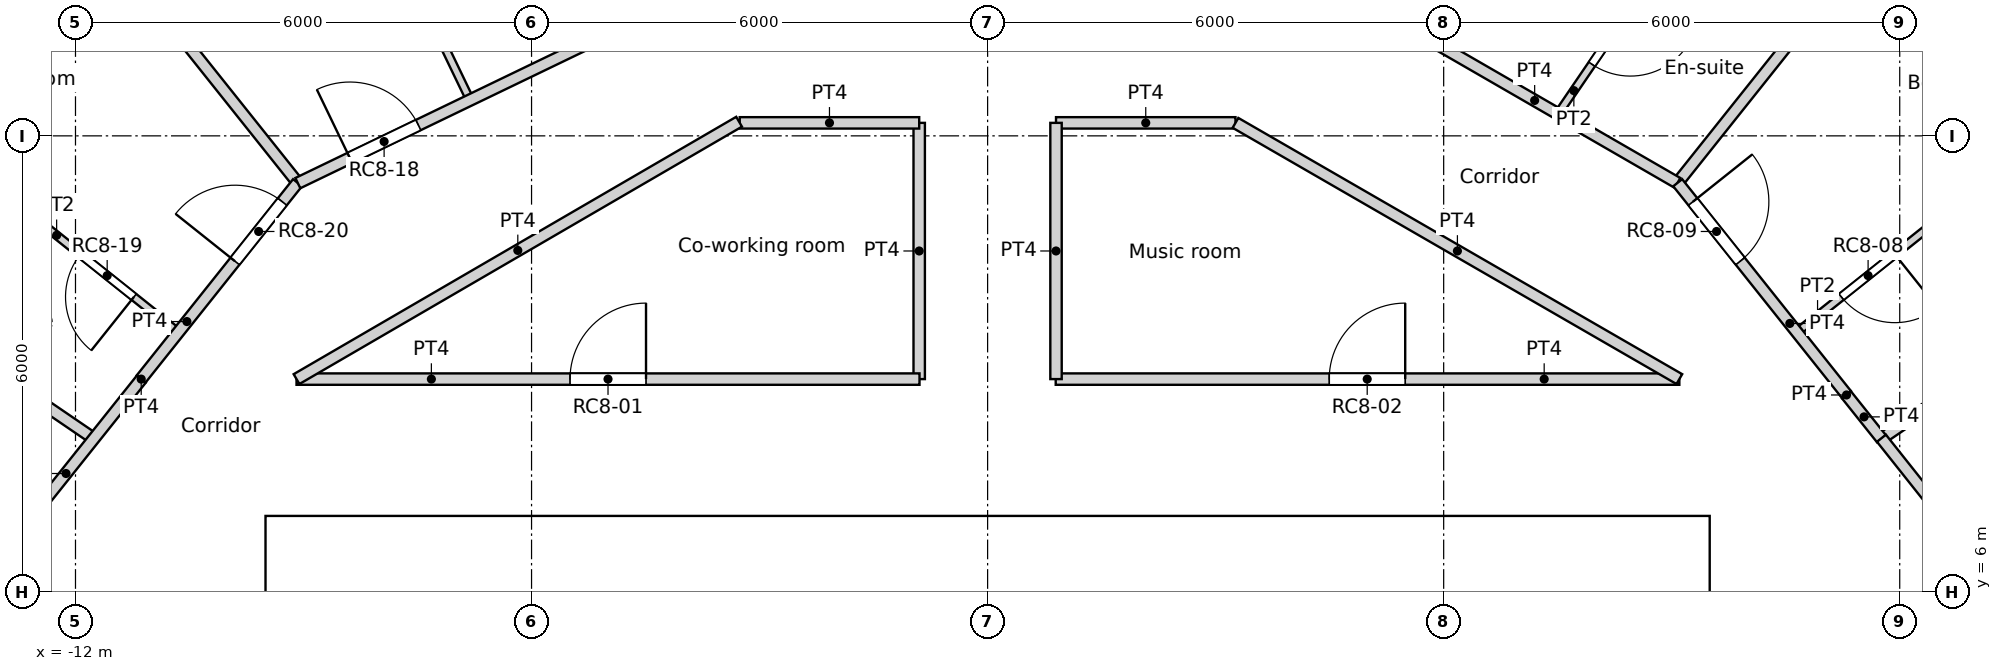
"""IFC4 building model, lengths in metres.
Left out: names, types, materials, properties, quantities, classifications, styles, units other than length and angle.
Written with IfcOpenShell. Run it as: python <this file> out.ifc"""

import sys

from ifc_helpers import new_model, si_unit, direction, frame, frame_2d, origin, place, context, subcontext, project, spatial, rectangle, extrude, element, fill, save


model = new_model("IFC4")
c1 = context("Model", 3, precision=1e-05, world=origin(), true_north=direction((0.0, 1.0)))
c2 = subcontext(c1, "Body", "Model", "MODEL_VIEW")
j1 = project(units=[si_unit("LENGTHUNIT", "METRE"), si_unit("PLANEANGLEUNIT", "RADIAN")], contexts=[c1])
p1 = place(None, origin())
s1 = spatial("IfcSite", under=j1, at=p1, CompositionType="ELEMENT")
p2 = place(p1, origin())
s2 = spatial("IfcBuilding", under=s1, at=p2, CompositionType="ELEMENT")
p3 = place(p2, frame((0.0, 0.0, 305.4)))
s3 = spatial("IfcBuildingStorey", under=s2, at=p3, CompositionType="ELEMENT", Elevation=305.4)
p4 = place(p3, frame((-9.5, 6.7, 0.0), z_axis=(0.0, 0.0, 1.0), x_axis=(1.0, 0.0, 0.0)))
e1 = element("IfcWall", 1, at=p4, inside=s3, PredefinedType="SOLIDWALL", context=c2, shape_type="SweptSolid", body=[
    extrude(rectangle(XDim=19.0, YDim=0.6, at=frame_2d((9.5, 0.0))), origin(), (0.0, 0.0, 1.0), 3.6),
])
p5 = place(p4, frame((5.35, 0.0, 0.0)))
e2 = element("IfcOpeningElement", 2, at=p5, cuts=e1, PredefinedType="OPENING", context=c2, shape_type="SweptSolid", body=[
    extrude(rectangle(XDim=1.7, YDim=2.1, at=frame_2d((0.85, 1.05))), frame((0.0, 0.3, 0.0), z_axis=(0.0, -1.0, 0.0), x_axis=(1.0, 0.0, 0.0)), (0.0, 0.0, 1.0), 0.6),
])
p6 = place(p3, frame((-9.2, -6.4, 0.0), z_axis=(0.0, 0.0, 1.0), x_axis=(0.0, 1.0, 0.0)))
e3 = element("IfcWall", 3, at=p6, inside=s3, PredefinedType="SOLIDWALL", context=c2, shape_type="SweptSolid", body=[
    extrude(rectangle(XDim=12.8, YDim=0.6, at=frame_2d((6.4, 0.0))), origin(), (0.0, 0.0, 1.0), 3.6),
])
p7 = place(p3, frame((9.2, -6.4, 0.0), z_axis=(0.0, 0.0, 1.0), x_axis=(0.0, 1.0, 0.0)))
e4 = element("IfcWall", 4, at=p7, inside=s3, PredefinedType="SOLIDWALL", context=c2, shape_type="SweptSolid", body=[
    extrude(rectangle(XDim=12.8, YDim=0.6, at=frame_2d((6.4, 0.0))), origin(), (0.0, 0.0, 1.0), 3.6),
])
p8 = place(p7, frame((6.4, 0.0, 0.0)))
e5 = element("IfcOpeningElement", 5, at=p8, cuts=e4, PredefinedType="OPENING", context=c2, shape_type="SweptSolid", body=[
    extrude(rectangle(XDim=1.8, YDim=2.1, at=frame_2d((0.9, 1.05))), frame((0.0, 0.3, 0.0), z_axis=(0.0, -1.0, 0.0), x_axis=(1.0, 0.0, 0.0)), (0.0, 0.0, 1.0), 0.6),
])
for number, where, z_axis, x_axis in (
    (6, (-2.25, 3.25, 0.0), (0.0, 0.0, 1.0), (0.0, 1.0, 0.0)),
    (7, (0.55, 3.25, 0.0), (0.0, 0.0, 1.0), (0.0, 1.0, 0.0)),
    (8, (3.35, 3.25, 0.0), (0.0, 0.0, 1.0), (0.0, 1.0, 0.0)),
    (9, (6.15, 3.25, 0.0), (0.0, 0.0, 1.0), (0.0, 1.0, 0.0)),
):
    element("IfcWall", number, at=place(p3, frame(where, z_axis=z_axis, x_axis=x_axis)), inside=s3, PredefinedType="SOLIDWALL", context=c2, shape_type="SweptSolid", body=[
        extrude(rectangle(XDim=3.15, YDim=0.3, at=frame_2d((1.575, 0.0))), origin(), (0.0, 0.0, 1.0), 3.25),
    ])
p9 = place(p3, frame((-9.092, 8.8, 0.0), z_axis=(0.0, 0.0, 1.0), x_axis=(0.864470922103, 0.502682827277, 0.0)))
e10 = element("IfcWall", 10, at=p9, inside=s3, PredefinedType="PARTITIONING", context=c2, shape_type="SweptSolid", body=[
    extrude(rectangle(XDim=6.735, YDim=0.15, at=frame_2d((3.368, 0.0))), origin(), (0.0, 0.0, 1.0), 3.25),
])
p10 = place(p3, frame((-9.092, 8.8, 0.0), z_axis=(0.0, 0.0, 1.0), x_axis=(1.0, 0.0, 0.0)))
e11 = element("IfcWall", 11, at=p10, inside=s3, PredefinedType="PARTITIONING", context=c2, shape_type="SweptSolid", body=[
    extrude(rectangle(XDim=8.196, YDim=0.15, at=frame_2d((4.098, 0.0))), origin(), (0.0, 0.0, 1.0), 3.25),
])
p11 = place(p10, frame((3.598, 0.0, 0.0)))
e12 = element("IfcOpeningElement", 12, at=p11, cuts=e11, PredefinedType="OPENING", context=c2, shape_type="SweptSolid", body=[
    extrude(rectangle(XDim=1.0, YDim=2.04, at=frame_2d((0.5, 1.02))), frame((0.0, 0.075, 0.0), z_axis=(0.0, -1.0, 0.0), x_axis=(1.0, 0.0, 0.0)), (0.0, 0.0, 1.0), 0.15),
])
p12 = place(p3, frame((0.896, 8.8, 0.0), z_axis=(0.0, 0.0, 1.0), x_axis=(1.0, 0.0, 0.0)))
e13 = element("IfcWall", 13, at=p12, inside=s3, PredefinedType="PARTITIONING", context=c2, shape_type="SweptSolid", body=[
    extrude(rectangle(XDim=8.205, YDim=0.15, at=frame_2d((4.102, 0.0))), origin(), (0.0, 0.0, 1.0), 3.25),
])
p13 = place(p12, frame((3.598, 0.0, 0.0)))
e14 = element("IfcOpeningElement", 14, at=p13, cuts=e13, PredefinedType="OPENING", context=c2, shape_type="SweptSolid", body=[
    extrude(rectangle(XDim=1.0, YDim=2.04, at=frame_2d((0.5, 1.02))), frame((0.0, 0.075, 0.0), z_axis=(0.0, -1.0, 0.0), x_axis=(1.0, 0.0, 0.0)), (0.0, 0.0, 1.0), 0.15),
])
p14 = place(p3, frame((9.079, 11.384, 0.0), z_axis=(0.0, 0.0, 1.0), x_axis=(0.623165080354, -0.782090328944, 0.0)))
e15 = element("IfcWall", 15, at=p14, inside=s3, PredefinedType="PARTITIONING", context=c2, shape_type="SweptSolid", body=[
    extrude(rectangle(XDim=3.564, YDim=0.15, at=frame_2d((1.782, 0.0))), origin(), (0.0, 0.0, 1.0), 3.25),
])
p15 = place(p14, frame((0.32, 0.0, 0.0)))
e16 = element("IfcOpeningElement", 16, at=p15, cuts=e15, PredefinedType="OPENING", context=c2, shape_type="SweptSolid", body=[
    extrude(rectangle(XDim=1.0, YDim=2.1, at=frame_2d((0.5, 1.05))), frame((0.0, 0.075, 0.0), z_axis=(0.0, -1.0, 0.0), x_axis=(1.0, 0.0, 0.0)), (0.0, 0.0, 1.0), 0.15),
])
p16 = place(p3, frame((11.3, 8.586, 0.0), z_axis=(0.0, 0.0, 1.0), x_axis=(0.0, 1.0, 0.0)))
e17 = element("IfcWall", 17, at=p16, inside=s3, PredefinedType="PARTITIONING", context=c2, shape_type="SweptSolid", body=[
    extrude(rectangle(XDim=0.01, YDim=0.15, at=frame_2d((0.005, 0.0))), origin(), (0.0, 0.0, 1.0), 3.25),
])
p17 = place(p3, frame((-11.136, 8.802, 0.0), z_axis=(0.0, 0.0, 1.0), x_axis=(0.623151397235, 0.782101231379, 0.0)))
e18 = element("IfcWall", 18, at=p17, inside=s3, PredefinedType="PARTITIONING", context=c2, shape_type="SweptSolid", body=[
    extrude(rectangle(XDim=3.301, YDim=0.15, at=frame_2d((1.65, 0.0))), origin(), (0.0, 0.0, 1.0), 3.25),
])
p18 = place(p17, frame((1.981, 0.0, 0.0)))
e19 = element("IfcOpeningElement", 19, at=p18, cuts=e18, PredefinedType="OPENING", context=c2, shape_type="SweptSolid", body=[
    extrude(rectangle(XDim=1.0, YDim=2.1, at=frame_2d((0.5, 1.05))), frame((0.0, 0.075, 0.0), z_axis=(0.0, -1.0, 0.0), x_axis=(1.0, 0.0, 0.0)), (0.0, 0.0, 1.0), 0.15),
])
p19 = place(p3, frame((-11.134, 8.8, 0.0), z_axis=(0.0, 0.0, 1.0), x_axis=(-1.0, 0.0, 0.0)))
e20 = element("IfcWall", 20, at=p19, inside=s3, PredefinedType="PARTITIONING", context=c2, shape_type="SweptSolid", body=[
    extrude(rectangle(XDim=0.003, YDim=0.15, at=frame_2d((0.001, 0.0))), origin(), (0.0, 0.0, 1.0), 3.25),
])
p20 = place(p3, frame((11.76, 8.022, 0.0), z_axis=(0.0, 0.0, 1.0), x_axis=(0.62206805366, -0.782963177049, 0.0)))
e21 = element("IfcWall", 21, at=p20, inside=s3, PredefinedType="PARTITIONING", context=c2, shape_type="SweptSolid", body=[
    extrude(rectangle(XDim=2.179, YDim=0.15, at=frame_2d((1.089, 0.0))), origin(), (0.0, 0.0, 1.0), 3.25),
])
p21 = place(p3, frame((11.3, 8.592, 0.0), z_axis=(0.0, 0.0, 1.0), x_axis=(0.623405636383, -0.781898594785, 0.0)))
e22 = element("IfcWall", 22, at=p21, inside=s3, PredefinedType="PARTITIONING", context=c2, shape_type="SweptSolid", body=[
    extrude(rectangle(XDim=0.74, YDim=0.15, at=frame_2d((0.37, 0.0))), origin(), (0.0, 0.0, 1.0), 3.25),
])
p22 = place(p3, frame((-0.9, 8.8, 0.0), z_axis=(0.0, 0.0, 1.0), x_axis=(0.0, 1.0, 0.0)))
e23 = element("IfcWall", 23, at=p22, inside=s3, PredefinedType="PARTITIONING", context=c2, shape_type="SweptSolid", body=[
    extrude(rectangle(XDim=3.371, YDim=0.15, at=frame_2d((1.686, 0.0))), origin(), (0.0, 0.0, 1.0), 3.25),
])
p23 = place(p3, frame((-3.261, 12.171, 0.0), z_axis=(0.0, 0.0, 1.0), x_axis=(1.0, 0.0, 0.0)))
e24 = element("IfcWall", 24, at=p23, inside=s3, PredefinedType="PARTITIONING", context=c2, shape_type="SweptSolid", body=[
    extrude(rectangle(XDim=2.361, YDim=0.15, at=frame_2d((1.181, 0.0))), origin(), (0.0, 0.0, 1.0), 3.25),
])
p24 = place(p3, frame((3.261, 12.171, 0.0), z_axis=(0.0, 0.0, 1.0), x_axis=(0.866066809554, -0.499928276245, 0.0)))
e25 = element("IfcWall", 25, at=p24, inside=s3, PredefinedType="PARTITIONING", context=c2, shape_type="SweptSolid", body=[
    extrude(rectangle(XDim=6.743, YDim=0.15, at=frame_2d((3.371, 0.0))), origin(), (0.0, 0.0, 1.0), 3.25),
])
p25 = place(p3, frame((0.9, 12.171, 0.0), z_axis=(0.0, 0.0, 1.0), x_axis=(1.0, 0.0, 0.0)))
e26 = element("IfcWall", 26, at=p25, inside=s3, PredefinedType="PARTITIONING", context=c2, shape_type="SweptSolid", body=[
    extrude(rectangle(XDim=2.361, YDim=0.15, at=frame_2d((1.181, 0.0))), origin(), (0.0, 0.0, 1.0), 3.25),
])
p26 = place(p3, frame((0.9, 8.8, 0.0), z_axis=(0.0, 0.0, 1.0), x_axis=(0.0, 1.0, 0.0)))
e27 = element("IfcWall", 27, at=p26, inside=s3, PredefinedType="PARTITIONING", context=c2, shape_type="SweptSolid", body=[
    extrude(rectangle(XDim=3.371, YDim=0.15, at=frame_2d((1.686, 0.0))), origin(), (0.0, 0.0, 1.0), 3.25),
])
p27 = place(p3, frame((5.318, 13.551, 0.0), z_axis=(0.0, 0.0, 1.0), x_axis=(0.865990693744, -0.500060114735, 0.0)))
e28 = element("IfcWall", 28, at=p27, inside=s3, PredefinedType="PARTITIONING", context=c2, shape_type="SweptSolid", body=[
    extrude(rectangle(XDim=4.339, YDim=0.15, at=frame_2d((2.17, 0.0))), origin(), (0.0, 0.0, 1.0), 3.25),
])
p28 = place(p3, frame((-9.075, 11.378, 0.0), z_axis=(0.0, 0.0, 1.0), x_axis=(0.900778421649, 0.434278983018, 0.0)))
e29 = element("IfcWall", 29, at=p28, inside=s3, PredefinedType="PARTITIONING", context=c2, shape_type="SweptSolid", body=[
    extrude(rectangle(XDim=6.479, YDim=0.15, at=frame_2d((3.239, 0.0))), origin(), (0.0, 0.0, 1.0), 3.25),
])
p29 = place(p28, frame((0.76, 0.0, 0.0)))
e30 = element("IfcOpeningElement", 30, at=p29, cuts=e29, PredefinedType="OPENING", context=c2, shape_type="SweptSolid", body=[
    extrude(rectangle(XDim=1.0, YDim=2.1, at=frame_2d((0.5, 1.05))), frame((0.0, 0.075, 0.0), z_axis=(0.0, -1.0, 0.0), x_axis=(1.0, 0.0, 0.0)), (0.0, 0.0, 1.0), 0.15),
])
p30 = place(p3, frame((-13.115, 6.316, 0.0), z_axis=(0.0, 0.0, 1.0), x_axis=(0.623560523309, 0.781775078761, 0.0)))
e31 = element("IfcWall", 31, at=p30, inside=s3, PredefinedType="PARTITIONING", context=c2, shape_type="SweptSolid", body=[
    extrude(rectangle(XDim=3.177, YDim=0.15, at=frame_2d((1.589, 0.0))), origin(), (0.0, 0.0, 1.0), 3.25),
])
p31 = place(p3, frame((11.759, 8.017, 0.0), z_axis=(0.0, 0.0, 1.0), x_axis=(0.826143746222, 0.563459413426, 0.0)))
e32 = element("IfcWall", 32, at=p31, inside=s3, PredefinedType="PARTITIONING", context=c2, shape_type="SweptSolid", body=[
    extrude(rectangle(XDim=2.41, YDim=0.15, at=frame_2d((1.205, 0.0))), origin(), (0.0, 0.0, 1.0), 3.25),
])
p32 = place(p3, frame((10.645, 9.413, 0.0), z_axis=(0.0, 0.0, 1.0), x_axis=(0.781830263661, 0.623491330191, 0.0)))
e33 = element("IfcWall", 33, at=p32, inside=s3, PredefinedType="PARTITIONING", context=c2, shape_type="SweptSolid", body=[
    extrude(rectangle(XDim=2.401, YDim=0.1, at=frame_2d((1.2, 0.0))), origin(), (0.0, 0.0, 1.0), 3.25),
])
p33 = place(p32, frame((0.751, 0.0, 0.0)))
e34 = element("IfcOpeningElement", 34, at=p33, cuts=e33, PredefinedType="OPENING", context=c2, shape_type="SweptSolid", body=[
    extrude(rectangle(XDim=0.9, YDim=2.04, at=frame_2d((0.45, 1.02))), frame((0.0, 0.05, 0.0), z_axis=(0.0, -1.0, 0.0), x_axis=(1.0, 0.0, 0.0)), (0.0, 0.0, 1.0), 0.1),
])
p34 = place(p3, frame((9.076, 11.381, 0.0), z_axis=(0.0, 0.0, 1.0), x_axis=(0.623409504508, 0.781895510723, 0.0)))
e35 = element("IfcWall", 35, at=p34, inside=s3, PredefinedType="PARTITIONING", context=c2, shape_type="SweptSolid", body=[
    extrude(rectangle(XDim=5.214, YDim=0.15, at=frame_2d((2.607, 0.0))), origin(), (0.0, 0.0, 1.0), 3.25),
])
p35 = place(p3, frame((7.504, 12.289, 0.0), z_axis=(0.0, 0.0, 1.0), x_axis=(0.563272733387, 0.826271037749, 0.0)))
e36 = element("IfcWall", 36, at=p35, inside=s3, PredefinedType="PARTITIONING", context=c2, shape_type="SweptSolid", body=[
    extrude(rectangle(XDim=2.482, YDim=0.1, at=frame_2d((1.241, 0.0))), origin(), (0.0, 0.0, 1.0), 3.25),
])
p36 = place(p35, frame((0.791, 0.0, 0.0)))
e37 = element("IfcOpeningElement", 37, at=p36, cuts=e36, PredefinedType="OPENING", context=c2, shape_type="SweptSolid", body=[
    extrude(rectangle(XDim=0.9, YDim=2.04, at=frame_2d((0.45, 1.02))), frame((0.0, 0.05, 0.0), z_axis=(0.0, -1.0, 0.0), x_axis=(1.0, 0.0, 0.0)), (0.0, 0.0, 1.0), 0.1),
])
p37 = place(p3, frame((-7.85, 14.635, 0.0), z_axis=(0.0, 0.0, 1.0), x_axis=(0.433815618773, -0.901001669759, 0.0)))
e38 = element("IfcWall", 38, at=p37, inside=s3, PredefinedType="PARTITIONING", context=c2, shape_type="SweptSolid", body=[
    extrude(rectangle(XDim=2.4, YDim=0.1, at=frame_2d((1.2, 0.0))), origin(), (0.0, 0.0, 1.0), 3.25),
])
p38 = place(p37, frame((0.75, 0.0, 0.0)))
e39 = element("IfcOpeningElement", 39, at=p38, cuts=e38, PredefinedType="OPENING", context=c2, shape_type="SweptSolid", body=[
    extrude(rectangle(XDim=0.9, YDim=2.04, at=frame_2d((0.45, 1.02))), frame((0.0, 0.05, 0.0), z_axis=(0.0, -1.0, 0.0), x_axis=(1.0, 0.0, 0.0)), (0.0, 0.0, 1.0), 0.1),
])
p39 = place(p3, frame((-12.327, 15.458, 0.0), z_axis=(0.0, 0.0, 1.0), x_axis=(0.623460949534, -0.781854490558, 0.0)))
e40 = element("IfcWall", 40, at=p39, inside=s3, PredefinedType="PARTITIONING", context=c2, shape_type="SweptSolid", body=[
    extrude(rectangle(XDim=5.214, YDim=0.15, at=frame_2d((2.607, 0.0))), origin(), (0.0, 0.0, 1.0), 3.25),
])
p40 = place(p3, frame((-12.522, 10.91, 0.0), z_axis=(0.0, 0.0, 1.0), x_axis=(0.781830263661, -0.623491330191, 0.0)))
e41 = element("IfcWall", 41, at=p40, inside=s3, PredefinedType="PARTITIONING", context=c2, shape_type="SweptSolid", body=[
    extrude(rectangle(XDim=2.401, YDim=0.1, at=frame_2d((1.2, 0.0))), origin(), (0.0, 0.0, 1.0), 3.25),
])
p41 = place(p40, frame((0.751, 0.0, 0.0)))
e42 = element("IfcOpeningElement", 42, at=p41, cuts=e41, PredefinedType="OPENING", context=c2, shape_type="SweptSolid", body=[
    extrude(rectangle(XDim=0.9, YDim=2.04, at=frame_2d((0.45, 1.02))), frame((0.0, 0.05, 0.0), z_axis=(0.0, -1.0, 0.0), x_axis=(1.0, 0.0, 0.0)), (0.0, 0.0, 1.0), 0.1),
])
p42 = place(p3, frame((-13.747, 9.373, 0.0), z_axis=(0.0, 0.0, 1.0), x_axis=(0.826135036312, -0.563472183677, 0.0)))
e43 = element("IfcWall", 43, at=p42, inside=s3, PredefinedType="PARTITIONING", context=c2, shape_type="SweptSolid", body=[
    extrude(rectangle(XDim=2.406, YDim=0.15, at=frame_2d((1.203, 0.0))), origin(), (0.0, 0.0, 1.0), 3.25),
])
p43 = place(p5, origin())
e44 = element("IfcDoor", 44, at=p43, inside=s3, OperationType="DOUBLE_DOOR_SINGLE_SWING", PredefinedType="DOOR", context=c2, shape_type="SweptSolid", body=[
    extrude(rectangle(XDim=1.7, YDim=2.1, at=frame_2d((0.85, 1.05))), frame((0.0, 0.025, 0.0), z_axis=(0.0, -1.0, 0.0), x_axis=(1.0, 0.0, 0.0)), (0.0, 0.0, 1.0), 0.05),
])
fill(e2, e44)
p44 = place(p11, origin())
e45 = element("IfcDoor", 45, at=p44, inside=s3, OperationType="SINGLE_SWING_RIGHT", PredefinedType="DOOR", context=c2, shape_type="SweptSolid", body=[
    extrude(rectangle(XDim=1.0, YDim=2.04, at=frame_2d((0.5, 1.02))), frame((0.0, 0.025, 0.0), z_axis=(0.0, -1.0, 0.0), x_axis=(1.0, 0.0, 0.0)), (0.0, 0.0, 1.0), 0.05),
])
fill(e12, e45)
p45 = place(p13, origin())
e46 = element("IfcDoor", 46, at=p45, inside=s3, OperationType="SINGLE_SWING_RIGHT", PredefinedType="DOOR", context=c2, shape_type="SweptSolid", body=[
    extrude(rectangle(XDim=1.0, YDim=2.04, at=frame_2d((0.5, 1.02))), frame((0.0, 0.025, 0.0), z_axis=(0.0, -1.0, 0.0), x_axis=(1.0, 0.0, 0.0)), (0.0, 0.0, 1.0), 0.05),
])
fill(e14, e46)
p46 = place(p33, origin())
e47 = element("IfcDoor", 47, at=p46, inside=s3, OperationType="SINGLE_SWING_LEFT", PredefinedType="DOOR", context=c2, shape_type="SweptSolid", body=[
    extrude(rectangle(XDim=0.9, YDim=2.04, at=frame_2d((0.45, 1.02))), frame((0.0, 0.025, 0.0), z_axis=(0.0, -1.0, 0.0), x_axis=(1.0, 0.0, 0.0)), (0.0, 0.0, 1.0), 0.05),
])
fill(e34, e47)
p47 = place(p15, origin())
e48 = element("IfcDoor", 48, at=p47, inside=s3, OperationType="SINGLE_SWING_LEFT", PredefinedType="DOOR", context=c2, shape_type="SweptSolid", body=[
    extrude(rectangle(XDim=1.0, YDim=2.1, at=frame_2d((0.5, 1.05))), frame((0.0, 0.025, 0.0), z_axis=(0.0, -1.0, 0.0), x_axis=(1.0, 0.0, 0.0)), (0.0, 0.0, 1.0), 0.05),
])
fill(e16, e48)
p48 = place(p36, origin())
e49 = element("IfcDoor", 49, at=p48, inside=s3, OperationType="SINGLE_SWING_LEFT", PredefinedType="DOOR", context=c2, shape_type="SweptSolid", body=[
    extrude(rectangle(XDim=0.9, YDim=2.04, at=frame_2d((0.45, 1.02))), frame((0.0, 0.025, 0.0), z_axis=(0.0, -1.0, 0.0), x_axis=(1.0, 0.0, 0.0)), (0.0, 0.0, 1.0), 0.05),
])
fill(e37, e49)
p49 = place(p29, origin())
e50 = element("IfcDoor", 50, at=p49, inside=s3, OperationType="SINGLE_SWING_LEFT", PredefinedType="DOOR", context=c2, shape_type="SweptSolid", body=[
    extrude(rectangle(XDim=1.0, YDim=2.1, at=frame_2d((0.5, 1.05))), frame((0.0, 0.025, 0.0), z_axis=(0.0, -1.0, 0.0), x_axis=(1.0, 0.0, 0.0)), (0.0, 0.0, 1.0), 0.05),
])
fill(e30, e50)
p50 = place(p41, origin())
e51 = element("IfcDoor", 51, at=p50, inside=s3, OperationType="SINGLE_SWING_LEFT", PredefinedType="DOOR", context=c2, shape_type="SweptSolid", body=[
    extrude(rectangle(XDim=0.9, YDim=2.04, at=frame_2d((0.45, 1.02))), frame((0.0, 0.025, 0.0), z_axis=(0.0, -1.0, 0.0), x_axis=(1.0, 0.0, 0.0)), (0.0, 0.0, 1.0), 0.05),
])
fill(e42, e51)
p51 = place(p18, origin())
e52 = element("IfcDoor", 52, at=p51, inside=s3, OperationType="SINGLE_SWING_LEFT", PredefinedType="DOOR", context=c2, shape_type="SweptSolid", body=[
    extrude(rectangle(XDim=1.0, YDim=2.1, at=frame_2d((0.5, 1.05))), frame((0.0, 0.025, 0.0), z_axis=(0.0, -1.0, 0.0), x_axis=(1.0, 0.0, 0.0)), (0.0, 0.0, 1.0), 0.05),
])
fill(e19, e52)
save(model, sys.argv[1])
